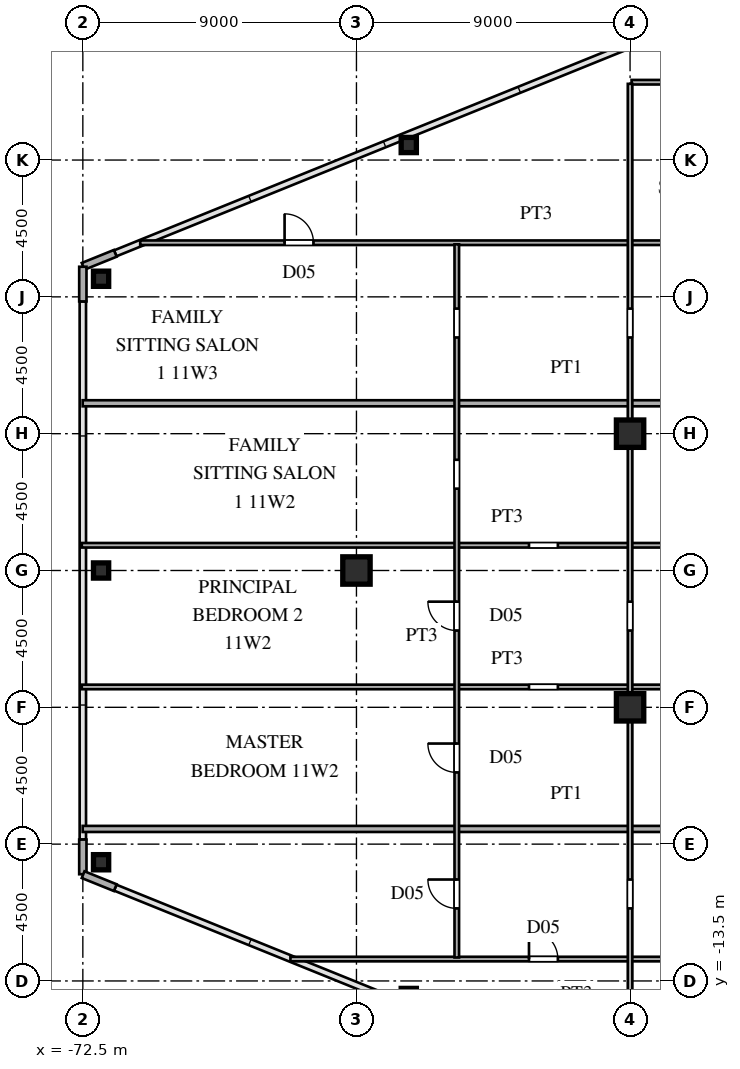
"""IFC4 building model, lengths in metres.
Left out: names, types, materials, properties, quantities, classifications, styles, units other than length and angle.
Written with IfcOpenShell. Run it as: python <this file> out.ifc"""

import sys

from ifc_helpers import new_model, si_unit, direction, frame, frame_2d, origin, origin_2d, place, context, subcontext, project, spatial, rectangle, hollow_rectangle, i_section, extrude, source, transform, mapped, element, fill, save


model = new_model("IFC4")
c1 = context("Model", 3, precision=1e-05, world=origin(), true_north=direction((0.0, 1.0)))
c2 = subcontext(c1, "Body", "Model", "MODEL_VIEW")
j1 = project(units=[si_unit("LENGTHUNIT", "METRE"), si_unit("PLANEANGLEUNIT", "RADIAN")], contexts=[c1])
p1 = place(None, origin())
s1 = spatial("IfcSite", under=j1, at=p1, CompositionType="ELEMENT")
p2 = place(p1, origin())
s2 = spatial("IfcBuilding", under=s1, at=p2, CompositionType="ELEMENT")
p3 = place(p2, frame((0.0, 0.0, 44.1)))
s3 = spatial("IfcBuildingStorey", under=s2, at=p3, CompositionType="ELEMENT", Elevation=44.1)
m1 = source(origin(), c2, "Body", "SweptSolid", [
    extrude(i_section(OverallWidth=0.9, OverallDepth=0.9, WebThickness=0.036, FlangeThickness=0.055, at=origin_2d()), origin(), (0.0, 0.0, 1.0), 3.6),
])
for number, where, z_axis, x_axis in (
    (1, (-54.5, -4.5, 0.0), (0.0, 0.0, 1.0), (1.0, 0.0, 0.0)),
    (2, (-54.5, 4.5, 0.0), (0.0, 0.0, 1.0), (1.0, 0.0, 0.0)),
    (3, (-63.5, 0.0, 0.0), (0.0, 0.0, 1.0), (1.0, 0.0, 0.0)),
):
    element("IfcColumn", number, at=place(p3, frame(where, z_axis=z_axis, x_axis=x_axis)), inside=s3, PredefinedType="COLUMN", context=c2, shape_type="MappedRepresentation", body=[
        mapped(m1, transform((0.0, 0.0, 0.0), scale=1.0)),
    ])
m2 = source(origin(), c2, "Body", "SweptSolid", [
    extrude(hollow_rectangle(XDim=0.5, YDim=0.5, WallThickness=0.02, at=origin_2d()), origin(), (0.0, 0.0, 1.0), 3.6),
])
for number, where, z_axis, x_axis in (
    (4, (-71.9, 9.596, 0.0), (0.0, 0.0, 1.0), (1.0, 0.0, 0.0)),
    (5, (-71.9, -9.596, 0.0), (0.0, 0.0, 1.0), (1.0, 0.0, 0.0)),
    (6, (-61.779, -13.994, 0.0), (0.0, 0.0, 1.0), (1.0, 0.0, 0.0)),
    (7, (-61.779, 13.994, 0.0), (0.0, 0.0, 1.0), (1.0, 0.0, 0.0)),
    (8, (-71.9, 0.0, 0.0), (0.0, 0.0, 1.0), (1.0, 0.0, 0.0)),
):
    element("IfcColumn", number, at=place(p3, frame(where, z_axis=z_axis, x_axis=x_axis)), inside=s3, PredefinedType="COLUMN", context=c2, shape_type="MappedRepresentation", body=[
        mapped(m2, transform((0.0, 0.0, 0.0), scale=1.0)),
    ])
for number, where, z_axis, x_axis in (
    (9, (-71.434, 10.431, 0.0), (0.0, 0.0, 1.0), (-0.927, -0.375, 0.0)),
    (10, (-72.5, 9.99, 0.0), (0.0, 0.0, 1.0), (0.0, -1.0, 0.0)),
    (11, (-72.5, -8.85, 0.0), (0.0, 0.0, 1.0), (0.0, -1.0, 0.0)),
    (12, (-72.491, -10.004, 0.0), (0.0, 0.0, 1.0), (0.927, -0.375, 0.0)),
):
    element("IfcWall", number, at=place(p3, frame(where, z_axis=z_axis, x_axis=x_axis)), inside=s3, PredefinedType="SOLIDWALL", context=c2, shape_type="SweptSolid", body=[
        extrude(rectangle(XDim=1.14, YDim=0.24, at=frame_2d((0.57, 0.0))), origin(), (0.0, 0.0, 1.0), 3.38),
    ])
p4 = place(p3, frame((-65.672, -12.78, 0.0), z_axis=(0.0, 0.0, 1.0), x_axis=(1.0, 0.0, 0.0)))
e13 = element("IfcWall", 13, at=p4, inside=s3, PredefinedType="PARTITIONING", context=c2, shape_type="SweptSolid", body=[
    extrude(rectangle(XDim=21.122, YDim=0.15, at=frame_2d((10.561, 0.0))), origin(), (0.0, 0.0, 1.0), 3.38),
])
p5 = place(p4, frame((15.697, 0.0, 0.0)))
e14 = element("IfcOpeningElement", 14, at=p5, cuts=e13, PredefinedType="OPENING", context=c2, shape_type="SweptSolid", body=[
    extrude(rectangle(XDim=0.95, YDim=2.15, at=frame_2d((0.475, 1.075))), frame((0.0, 0.085, 0.0), z_axis=(0.0, -1.0, 0.0), x_axis=(1.0, 0.0, 0.0)), (0.0, 0.0, 1.0), 0.17),
])
p6 = place(p4, frame((7.847, 0.0, 0.0)))
e15 = element("IfcOpeningElement", 15, at=p6, cuts=e13, PredefinedType="OPENING", context=c2, shape_type="SweptSolid", body=[
    extrude(rectangle(XDim=0.95, YDim=2.15, at=frame_2d((0.475, 1.075))), frame((0.0, 0.085, 0.0), z_axis=(0.0, -1.0, 0.0), x_axis=(1.0, 0.0, 0.0)), (0.0, 0.0, 1.0), 0.17),
])
p7 = place(p3, frame((-72.505, -8.5, 0.0), z_axis=(0.0, 0.0, 1.0), x_axis=(1.0, 0.0, 0.0)))
e16 = element("IfcWall", 16, at=p7, inside=s3, PredefinedType="PARTITIONING", context=c2, shape_type="SweptSolid", body=[
    extrude(rectangle(XDim=34.125, YDim=0.2, at=frame_2d((17.062, 0.0))), origin(), (0.0, 0.0, 1.0), 3.38),
])
p8 = place(p3, frame((-72.535, -3.83, 0.0), z_axis=(0.0, 0.0, 1.0), x_axis=(1.0, 0.0, 0.0)))
e17 = element("IfcWall", 17, at=p8, inside=s3, PredefinedType="PARTITIONING", context=c2, shape_type="SweptSolid", body=[
    extrude(rectangle(XDim=27.985, YDim=0.15, at=frame_2d((13.992, 0.0))), origin(), (0.0, 0.0, 1.0), 3.38),
])
p9 = place(p8, frame((22.56, 0.0, 0.0)))
e18 = element("IfcOpeningElement", 18, at=p9, cuts=e17, PredefinedType="OPENING", context=c2, shape_type="SweptSolid", body=[
    extrude(rectangle(XDim=0.95, YDim=2.15, at=frame_2d((0.475, 1.075))), frame((0.0, 0.085, 0.0), z_axis=(0.0, -1.0, 0.0), x_axis=(1.0, 0.0, 0.0)), (0.0, 0.0, 1.0), 0.17),
])
p10 = place(p8, frame((14.71, 0.0, 0.0)))
e19 = element("IfcOpeningElement", 19, at=p10, cuts=e17, PredefinedType="OPENING", context=c2, shape_type="SweptSolid", body=[
    extrude(rectangle(XDim=0.95, YDim=2.15, at=frame_2d((0.475, 1.075))), frame((0.0, 0.085, 0.0), z_axis=(0.0, -1.0, 0.0), x_axis=(1.0, 0.0, 0.0)), (0.0, 0.0, 1.0), 0.17),
])
p11 = place(p3, frame((-72.535, 0.83, 0.0), z_axis=(0.0, 0.0, 1.0), x_axis=(1.0, 0.0, 0.0)))
e20 = element("IfcWall", 20, at=p11, inside=s3, PredefinedType="PARTITIONING", context=c2, shape_type="SweptSolid", body=[
    extrude(rectangle(XDim=27.985, YDim=0.15, at=frame_2d((13.992, 0.0))), origin(), (0.0, 0.0, 1.0), 3.38),
])
p12 = place(p11, frame((22.56, 0.0, 0.0)))
e21 = element("IfcOpeningElement", 21, at=p12, cuts=e20, PredefinedType="OPENING", context=c2, shape_type="SweptSolid", body=[
    extrude(rectangle(XDim=0.95, YDim=2.15, at=frame_2d((0.475, 1.075))), frame((0.0, 0.085, 0.0), z_axis=(0.0, -1.0, 0.0), x_axis=(1.0, 0.0, 0.0)), (0.0, 0.0, 1.0), 0.17),
])
p13 = place(p11, frame((14.71, 0.0, 0.0)))
e22 = element("IfcOpeningElement", 22, at=p13, cuts=e20, PredefinedType="OPENING", context=c2, shape_type="SweptSolid", body=[
    extrude(rectangle(XDim=0.95, YDim=2.15, at=frame_2d((0.475, 1.075))), frame((0.0, 0.085, 0.0), z_axis=(0.0, -1.0, 0.0), x_axis=(1.0, 0.0, 0.0)), (0.0, 0.0, 1.0), 0.17),
])
p14 = place(p3, frame((-72.505, 5.5, 0.0), z_axis=(0.0, 0.0, 1.0), x_axis=(1.0, 0.0, 0.0)))
e23 = element("IfcWall", 23, at=p14, inside=s3, PredefinedType="PARTITIONING", context=c2, shape_type="SweptSolid", body=[
    extrude(rectangle(XDim=34.125, YDim=0.2, at=frame_2d((17.062, 0.0))), origin(), (0.0, 0.0, 1.0), 3.38),
])
p15 = place(p3, frame((-70.613, 10.78, 0.0), z_axis=(0.0, 0.0, 1.0), x_axis=(1.0, 0.0, 0.0)))
e24 = element("IfcWall", 24, at=p15, inside=s3, PredefinedType="PARTITIONING", context=c2, shape_type="SweptSolid", body=[
    extrude(rectangle(XDim=26.063, YDim=0.15, at=frame_2d((13.031, 0.0))), origin(), (0.0, 0.0, 1.0), 3.38),
])
p16 = place(p15, frame((4.749, 0.0, 0.0)))
e25 = element("IfcOpeningElement", 25, at=p16, cuts=e24, PredefinedType="OPENING", context=c2, shape_type="SweptSolid", body=[
    extrude(rectangle(XDim=0.95, YDim=2.15, at=frame_2d((0.475, 1.075))), frame((0.0, 0.085, 0.0), z_axis=(0.0, -1.0, 0.0), x_axis=(1.0, 0.0, 0.0)), (0.0, 0.0, 1.0), 0.17),
])
p17 = place(p3, frame((-54.45, 16.06, 0.0), z_axis=(0.0, 0.0, 1.0), x_axis=(1.0, 0.0, 0.0)))
e26 = element("IfcWall", 26, at=p17, inside=s3, PredefinedType="PARTITIONING", context=c2, shape_type="SweptSolid", body=[
    extrude(rectangle(XDim=9.9, YDim=0.15, at=frame_2d((4.95, 0.0))), origin(), (0.0, 0.0, 1.0), 3.38),
])
p18 = place(p17, frame((4.475, 0.0, 0.0)))
e27 = element("IfcOpeningElement", 27, at=p18, cuts=e26, PredefinedType="OPENING", context=c2, shape_type="SweptSolid", body=[
    extrude(rectangle(XDim=0.95, YDim=2.15, at=frame_2d((0.475, 1.075))), frame((0.0, 0.085, 0.0), z_axis=(0.0, -1.0, 0.0), x_axis=(1.0, 0.0, 0.0)), (0.0, 0.0, 1.0), 0.17),
])
p19 = place(p3, frame((-60.2, -12.728, 0.0), z_axis=(0.0, 0.0, 1.0), x_axis=(0.0, 1.0, 0.0)))
e28 = element("IfcWall", 28, at=p19, inside=s3, PredefinedType="PARTITIONING", context=c2, shape_type="SweptSolid", body=[
    extrude(rectangle(XDim=23.456, YDim=0.15, at=frame_2d((11.728, 0.0))), origin(), (0.0, 0.0, 1.0), 3.38),
])
p20 = place(p19, frame((1.614, 0.0, 0.0)))
e29 = element("IfcOpeningElement", 29, at=p20, cuts=e28, PredefinedType="OPENING", context=c2, shape_type="SweptSolid", body=[
    extrude(rectangle(XDim=0.95, YDim=2.15, at=frame_2d((0.475, 1.075))), frame((0.0, 0.085, 0.0), z_axis=(0.0, -1.0, 0.0), x_axis=(1.0, 0.0, 0.0)), (0.0, 0.0, 1.0), 0.17),
])
p21 = place(p19, frame((6.086, 0.0, 0.0)))
e30 = element("IfcOpeningElement", 30, at=p21, cuts=e28, PredefinedType="OPENING", context=c2, shape_type="SweptSolid", body=[
    extrude(rectangle(XDim=0.95, YDim=2.15, at=frame_2d((0.475, 1.075))), frame((0.0, 0.085, 0.0), z_axis=(0.0, -1.0, 0.0), x_axis=(1.0, 0.0, 0.0)), (0.0, 0.0, 1.0), 0.17),
])
p22 = place(p19, frame((10.753, 0.0, 0.0)))
e31 = element("IfcOpeningElement", 31, at=p22, cuts=e28, PredefinedType="OPENING", context=c2, shape_type="SweptSolid", body=[
    extrude(rectangle(XDim=0.95, YDim=2.15, at=frame_2d((0.475, 1.075))), frame((0.0, 0.085, 0.0), z_axis=(0.0, -1.0, 0.0), x_axis=(1.0, 0.0, 0.0)), (0.0, 0.0, 1.0), 0.17),
])
p23 = place(p19, frame((15.42, 0.0, 0.0)))
e32 = element("IfcOpeningElement", 32, at=p23, cuts=e28, PredefinedType="OPENING", context=c2, shape_type="SweptSolid", body=[
    extrude(rectangle(XDim=0.95, YDim=2.15, at=frame_2d((0.475, 1.075))), frame((0.0, 0.085, 0.0), z_axis=(0.0, -1.0, 0.0), x_axis=(1.0, 0.0, 0.0)), (0.0, 0.0, 1.0), 0.17),
])
p24 = place(p19, frame((20.392, 0.0, 0.0)))
e33 = element("IfcOpeningElement", 33, at=p24, cuts=e28, PredefinedType="OPENING", context=c2, shape_type="SweptSolid", body=[
    extrude(rectangle(XDim=0.95, YDim=2.15, at=frame_2d((0.475, 1.075))), frame((0.0, 0.085, 0.0), z_axis=(0.0, -1.0, 0.0), x_axis=(1.0, 0.0, 0.0)), (0.0, 0.0, 1.0), 0.17),
])
p25 = place(p3, frame((-54.5, -17.006, 0.0), z_axis=(0.0, 0.0, 1.0), x_axis=(0.0, 1.0, 0.0)))
e34 = element("IfcWall", 34, at=p25, inside=s3, PredefinedType="PARTITIONING", context=c2, shape_type="SweptSolid", body=[
    extrude(rectangle(XDim=33.012, YDim=0.15, at=frame_2d((16.506, 0.0))), origin(), (0.0, 0.0, 1.0), 2.68),
])
p26 = place(p25, frame((5.892, 0.0, 0.0)))
e35 = element("IfcOpeningElement", 35, at=p26, cuts=e34, PredefinedType="OPENING", context=c2, shape_type="SweptSolid", body=[
    extrude(rectangle(XDim=0.95, YDim=2.15, at=frame_2d((0.475, 1.075))), frame((0.0, 0.085, 0.0), z_axis=(0.0, -1.0, 0.0), x_axis=(1.0, 0.0, 0.0)), (0.0, 0.0, 1.0), 0.17),
])
p27 = place(p25, frame((15.031, 0.0, 0.0)))
e36 = element("IfcOpeningElement", 36, at=p27, cuts=e34, PredefinedType="OPENING", context=c2, shape_type="SweptSolid", body=[
    extrude(rectangle(XDim=0.95, YDim=2.15, at=frame_2d((0.475, 1.075))), frame((0.0, 0.085, 0.0), z_axis=(0.0, -1.0, 0.0), x_axis=(1.0, 0.0, 0.0)), (0.0, 0.0, 1.0), 0.17),
])
p28 = place(p25, frame((24.67, 0.0, 0.0)))
e37 = element("IfcOpeningElement", 37, at=p28, cuts=e34, PredefinedType="OPENING", context=c2, shape_type="SweptSolid", body=[
    extrude(rectangle(XDim=0.95, YDim=2.15, at=frame_2d((0.475, 1.075))), frame((0.0, 0.085, 0.0), z_axis=(0.0, -1.0, 0.0), x_axis=(1.0, 0.0, 0.0)), (0.0, 0.0, 1.0), 0.17),
])
m3 = source(origin(), c2, "Body", "SweptSolid", [
    extrude(rectangle(XDim=0.95, YDim=2.15, at=frame_2d((0.475, 1.075))), frame((0.0, 0.025, 0.0), z_axis=(0.0, -1.0, 0.0), x_axis=(1.0, 0.0, 0.0)), (0.0, 0.0, 1.0), 0.05),
])
p29 = place(p6, origin())
e38 = element("IfcDoor", 38, at=p29, inside=s3, OperationType="SINGLE_SWING_LEFT", PredefinedType="DOOR", context=c2, shape_type="MappedRepresentation", body=[
    mapped(m3, transform((0.0, 0.0, 0.0), scale=1.0)),
])
fill(e15, e38)
p30 = place(p16, origin())
e39 = element("IfcDoor", 39, at=p30, inside=s3, OperationType="SINGLE_SWING_LEFT", PredefinedType="DOOR", context=c2, shape_type="MappedRepresentation", body=[
    mapped(m3, transform((0.0, 0.0, 0.0), scale=1.0)),
])
fill(e25, e39)
p31 = place(p20, origin())
e40 = element("IfcDoor", 40, at=p31, inside=s3, OperationType="SINGLE_SWING_RIGHT", PredefinedType="DOOR", context=c2, shape_type="MappedRepresentation", body=[
    mapped(m3, transform((0.0, 0.0, 0.0), scale=1.0)),
])
fill(e29, e40)
p32 = place(p21, origin())
e41 = element("IfcDoor", 41, at=p32, inside=s3, OperationType="SINGLE_SWING_RIGHT", PredefinedType="DOOR", context=c2, shape_type="MappedRepresentation", body=[
    mapped(m3, transform((0.0, 0.0, 0.0), scale=1.0)),
])
fill(e30, e41)
p33 = place(p22, origin())
e42 = element("IfcDoor", 42, at=p33, inside=s3, OperationType="SINGLE_SWING_RIGHT", PredefinedType="DOOR", context=c2, shape_type="MappedRepresentation", body=[
    mapped(m3, transform((0.0, 0.0, 0.0), scale=1.0)),
])
fill(e31, e42)
save(model, sys.argv[1])
